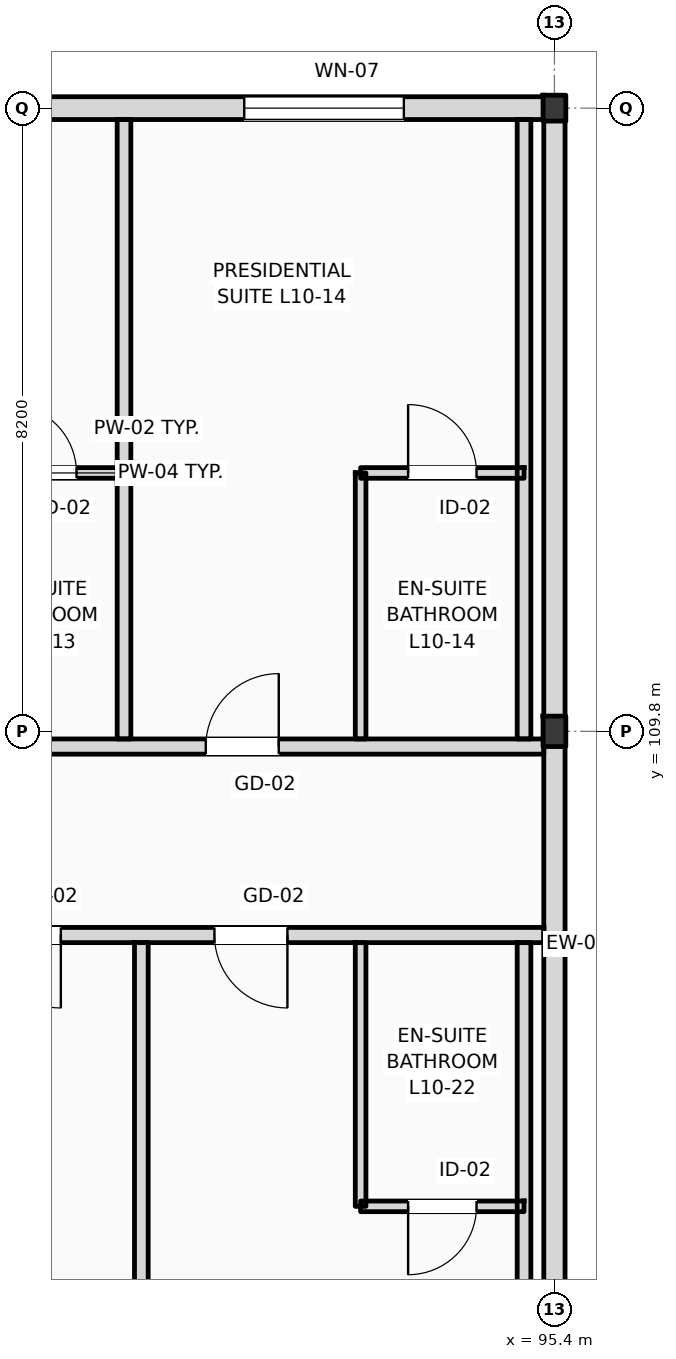
"""IFC4 building model, lengths in metres.
Left out: names, types, materials, properties, quantities, classifications, styles, units other than length and angle.
Written with IfcOpenShell. Run it as: python <this file> out.ifc"""

import sys

from ifc_helpers import new_model, si_unit, direction, frame, frame_2d, origin, origin_2d, place, context, subcontext, project, spatial, rectangle, i_section, extrude, element, fill, save


model = new_model("IFC4")
c1 = context("Model", 3, precision=1e-05, world=origin(), true_north=direction((0.0, 1.0)))
c2 = subcontext(c1, "Body", "Model", "MODEL_VIEW")
j1 = project(units=[si_unit("LENGTHUNIT", "METRE"), si_unit("PLANEANGLEUNIT", "RADIAN")], contexts=[c1])
p1 = place(None, origin())
s1 = spatial("IfcSite", under=j1, at=p1, CompositionType="ELEMENT")
p2 = place(p1, origin())
s2 = spatial("IfcBuilding", under=s1, at=p2, CompositionType="ELEMENT")
p3 = place(p2, frame((0.0, 0.0, 42.6)))
s3 = spatial("IfcBuildingStorey", under=s2, at=p3, CompositionType="ELEMENT", Elevation=42.6)
p4 = place(p3, frame((95.4, 109.8, 0.0), z_axis=(0.0, 0.0, 1.0), x_axis=(1.0, 0.0, 0.0)))
e1 = element("IfcColumn", 1, at=p4, inside=s3, PredefinedType="COLUMN", context=c2, shape_type="SweptSolid", body=[
    extrude(i_section(OverallWidth=0.3, OverallDepth=0.4, WebThickness=0.013, FlangeThickness=0.024, FilletRadius=0.027, at=origin_2d()), origin(), (0.0, 0.0, 1.0), 4.2),
])
p5 = place(p3, frame((95.4, 118.0, 0.0), z_axis=(0.0, 0.0, 1.0), x_axis=(1.0, 0.0, 0.0)))
e2 = element("IfcColumn", 2, at=p5, inside=s3, PredefinedType="COLUMN", context=c2, shape_type="SweptSolid", body=[
    extrude(i_section(OverallWidth=0.3, OverallDepth=0.34, WebThickness=0.012, FlangeThickness=0.021, FilletRadius=0.027, at=origin_2d()), origin(), (0.0, 0.0, 1.0), 4.2),
])
p6 = place(p3, frame((22.5, 118.0, 0.0), z_axis=(0.0, 0.0, 1.0), x_axis=(1.0, 0.0, 0.0)))
e3 = element("IfcWall", 3, at=p6, inside=s3, PredefinedType="STANDARD", context=c2, shape_type="SweptSolid", body=[
    extrude(rectangle(XDim=72.9, YDim=0.3, at=frame_2d((36.45, 0.0))), origin(), (0.0, 0.0, 1.0), 3.42),
])
p7 = place(p6, frame((3.611, 0.0, 0.9)))
e4 = element("IfcOpeningElement", 4, at=p7, cuts=e3, PredefinedType="OPENING", context=c2, shape_type="SweptSolid", body=[
    extrude(rectangle(XDim=1.35, YDim=1.75, at=frame_2d((0.675, 0.875))), frame((0.0, 0.16, 0.0), z_axis=(0.0, -1.0, 0.0), x_axis=(1.0, 0.0, 0.0)), (0.0, 0.0, 1.0), 0.32),
])
p8 = place(p6, frame((7.091, 0.0, 0.0)))
e5 = element("IfcOpeningElement", 5, at=p8, cuts=e3, PredefinedType="OPENING", context=c2, shape_type="SweptSolid", body=[
    extrude(rectangle(XDim=1.2, YDim=2.25, at=frame_2d((0.6, 1.125))), frame((0.0, 0.16, 0.0), z_axis=(0.0, -1.0, 0.0), x_axis=(1.0, 0.0, 0.0)), (0.0, 0.0, 1.0), 0.32),
])
p9 = place(p6, frame((12.328, 0.0, 0.9)))
e6 = element("IfcOpeningElement", 6, at=p9, cuts=e3, PredefinedType="OPENING", context=c2, shape_type="SweptSolid", body=[
    extrude(rectangle(XDim=2.0, YDim=2.34, at=frame_2d((1.0, 1.17))), frame((0.0, 0.16, 0.0), z_axis=(0.0, -1.0, 0.0), x_axis=(1.0, 0.0, 0.0)), (0.0, 0.0, 1.0), 0.32),
])
p10 = place(p6, frame((19.12, 0.0, 0.9)))
e7 = element("IfcOpeningElement", 7, at=p10, cuts=e3, PredefinedType="OPENING", context=c2, shape_type="SweptSolid", body=[
    extrude(rectangle(XDim=1.35, YDim=2.34, at=frame_2d((0.675, 1.17))), frame((0.0, 0.16, 0.0), z_axis=(0.0, -1.0, 0.0), x_axis=(1.0, 0.0, 0.0)), (0.0, 0.0, 1.0), 0.32),
])
p11 = place(p6, frame((22.696, 0.0, 0.0)))
e8 = element("IfcOpeningElement", 8, at=p11, cuts=e3, PredefinedType="OPENING", context=c2, shape_type="SweptSolid", body=[
    extrude(rectangle(XDim=1.2, YDim=2.25, at=frame_2d((0.6, 1.125))), frame((0.0, 0.16, 0.0), z_axis=(0.0, -1.0, 0.0), x_axis=(1.0, 0.0, 0.0)), (0.0, 0.0, 1.0), 0.32),
])
p12 = place(p6, frame((27.205, 0.0, 0.9)))
e9 = element("IfcOpeningElement", 9, at=p12, cuts=e3, PredefinedType="OPENING", context=c2, shape_type="SweptSolid", body=[
    extrude(rectangle(XDim=3.1, YDim=2.34, at=frame_2d((1.55, 1.17))), frame((0.0, 0.16, 0.0), z_axis=(0.0, -1.0, 0.0), x_axis=(1.0, 0.0, 0.0)), (0.0, 0.0, 1.0), 0.32),
])
p13 = place(p6, frame((31.948, 0.0, 0.9)))
e10 = element("IfcOpeningElement", 10, at=p13, cuts=e3, PredefinedType="OPENING", context=c2, shape_type="SweptSolid", body=[
    extrude(rectangle(XDim=1.1, YDim=2.34, at=frame_2d((0.55, 1.17))), frame((0.0, 0.16, 0.0), z_axis=(0.0, -1.0, 0.0), x_axis=(1.0, 0.0, 0.0)), (0.0, 0.0, 1.0), 0.32),
])
p14 = place(p6, frame((38.12, 0.0, 0.0)))
e11 = element("IfcOpeningElement", 11, at=p14, cuts=e3, PredefinedType="OPENING", context=c2, shape_type="SweptSolid", body=[
    extrude(rectangle(XDim=1.2, YDim=2.25, at=frame_2d((0.6, 1.125))), frame((0.0, 0.16, 0.0), z_axis=(0.0, -1.0, 0.0), x_axis=(1.0, 0.0, 0.0)), (0.0, 0.0, 1.0), 0.32),
])
p15 = place(p6, frame((43.51, 0.0, 0.9)))
e12 = element("IfcOpeningElement", 12, at=p15, cuts=e3, PredefinedType="OPENING", context=c2, shape_type="SweptSolid", body=[
    extrude(rectangle(XDim=1.35, YDim=1.85, at=frame_2d((0.675, 0.925))), frame((0.0, 0.16, 0.0), z_axis=(0.0, -1.0, 0.0), x_axis=(1.0, 0.0, 0.0)), (0.0, 0.0, 1.0), 0.32),
])
p16 = place(p6, frame((47.178, 0.0, 0.9)))
e13 = element("IfcOpeningElement", 13, at=p16, cuts=e3, PredefinedType="OPENING", context=c2, shape_type="SweptSolid", body=[
    extrude(rectangle(XDim=1.5, YDim=1.9, at=frame_2d((0.75, 0.95))), frame((0.0, 0.16, 0.0), z_axis=(0.0, -1.0, 0.0), x_axis=(1.0, 0.0, 0.0)), (0.0, 0.0, 1.0), 0.32),
])
p17 = place(p6, frame((53.724, 0.0, 0.0)))
e14 = element("IfcOpeningElement", 14, at=p17, cuts=e3, PredefinedType="OPENING", context=c2, shape_type="SweptSolid", body=[
    extrude(rectangle(XDim=1.2, YDim=2.25, at=frame_2d((0.6, 1.125))), frame((0.0, 0.16, 0.0), z_axis=(0.0, -1.0, 0.0), x_axis=(1.0, 0.0, 0.0)), (0.0, 0.0, 1.0), 0.32),
])
p18 = place(p6, frame((58.712, 0.0, 0.9)))
e15 = element("IfcOpeningElement", 15, at=p18, cuts=e3, PredefinedType="OPENING", context=c2, shape_type="SweptSolid", body=[
    extrude(rectangle(XDim=1.8, YDim=2.0, at=frame_2d((0.9, 1.0))), frame((0.0, 0.16, 0.0), z_axis=(0.0, -1.0, 0.0), x_axis=(1.0, 0.0, 0.0)), (0.0, 0.0, 1.0), 0.32),
])
p19 = place(p6, frame((62.781, 0.0, 0.9)))
e16 = element("IfcOpeningElement", 16, at=p19, cuts=e3, PredefinedType="OPENING", context=c2, shape_type="SweptSolid", body=[
    extrude(rectangle(XDim=1.35, YDim=2.05, at=frame_2d((0.675, 1.025))), frame((0.0, 0.16, 0.0), z_axis=(0.0, -1.0, 0.0), x_axis=(1.0, 0.0, 0.0)), (0.0, 0.0, 1.0), 0.32),
])
p20 = place(p6, frame((68.819, 0.0, 0.9)))
e17 = element("IfcOpeningElement", 17, at=p20, cuts=e3, PredefinedType="OPENING", context=c2, shape_type="SweptSolid", body=[
    extrude(rectangle(XDim=2.1, YDim=2.1, at=frame_2d((1.05, 1.05))), frame((0.0, 0.16, 0.0), z_axis=(0.0, -1.0, 0.0), x_axis=(1.0, 0.0, 0.0)), (0.0, 0.0, 1.0), 0.32),
])
p21 = place(p3, frame((95.4, 96.0, 0.0), z_axis=(0.0, 0.0, 1.0), x_axis=(0.0, 1.0, 0.0)))
e18 = element("IfcWall", 18, at=p21, inside=s3, PredefinedType="STANDARD", context=c2, shape_type="SweptSolid", body=[
    extrude(rectangle(XDim=22.0, YDim=0.28, at=frame_2d((11.0, 0.0))), origin(), (0.0, 0.0, 1.0), 3.51),
])
p22 = place(p3, frame((10.65, 109.6, 0.0), z_axis=(0.0, 0.0, 1.0), x_axis=(1.0, 0.0, 0.0)))
e19 = element("IfcWall", 19, at=p22, inside=s3, PredefinedType="PARTITIONING", context=c2, shape_type="SweptSolid", body=[
    extrude(rectangle(XDim=84.61, YDim=0.2, at=frame_2d((42.305, 0.0))), origin(), (0.0, 0.0, 1.0), 3.38),
])
p23 = place(p22, frame((15.926, 0.0, 0.0)))
e20 = element("IfcOpeningElement", 20, at=p23, cuts=e19, PredefinedType="OPENING", context=c2, shape_type="SweptSolid", body=[
    extrude(rectangle(XDim=1.02, YDim=2.2, at=frame_2d((0.51, 1.1))), frame((0.0, 0.11, 0.0), z_axis=(0.0, -1.0, 0.0), x_axis=(1.0, 0.0, 0.0)), (0.0, 0.0, 1.0), 0.22),
])
p24 = place(p22, frame((18.45, 0.0, 0.0)))
e21 = element("IfcOpeningElement", 21, at=p24, cuts=e19, PredefinedType="OPENING", context=c2, shape_type="SweptSolid", body=[
    extrude(rectangle(XDim=1.02, YDim=2.2, at=frame_2d((0.51, 1.1))), frame((0.0, 0.11, 0.0), z_axis=(0.0, -1.0, 0.0), x_axis=(1.0, 0.0, 0.0)), (0.0, 0.0, 1.0), 0.22),
])
p25 = place(p22, frame((25.742, 0.0, 0.0)))
e22 = element("IfcOpeningElement", 22, at=p25, cuts=e19, PredefinedType="OPENING", context=c2, shape_type="SweptSolid", body=[
    extrude(rectangle(XDim=1.02, YDim=2.2, at=frame_2d((0.51, 1.1))), frame((0.0, 0.11, 0.0), z_axis=(0.0, -1.0, 0.0), x_axis=(1.0, 0.0, 0.0)), (0.0, 0.0, 1.0), 0.22),
])
p26 = place(p22, frame((31.385, 0.0, 0.0)))
e23 = element("IfcOpeningElement", 23, at=p26, cuts=e19, PredefinedType="OPENING", context=c2, shape_type="SweptSolid", body=[
    extrude(rectangle(XDim=1.02, YDim=2.2, at=frame_2d((0.51, 1.1))), frame((0.0, 0.11, 0.0), z_axis=(0.0, -1.0, 0.0), x_axis=(1.0, 0.0, 0.0)), (0.0, 0.0, 1.0), 0.22),
])
p27 = place(p22, frame((33.908, 0.0, 0.0)))
e24 = element("IfcOpeningElement", 24, at=p27, cuts=e19, PredefinedType="OPENING", context=c2, shape_type="SweptSolid", body=[
    extrude(rectangle(XDim=0.96, YDim=2.2, at=frame_2d((0.48, 1.1))), frame((0.0, 0.11, 0.0), z_axis=(0.0, -1.0, 0.0), x_axis=(1.0, 0.0, 0.0)), (0.0, 0.0, 1.0), 0.22),
])
p28 = place(p22, frame((41.201, 0.0, 0.0)))
e25 = element("IfcOpeningElement", 25, at=p28, cuts=e19, PredefinedType="OPENING", context=c2, shape_type="SweptSolid", body=[
    extrude(rectangle(XDim=0.96, YDim=2.2, at=frame_2d((0.48, 1.1))), frame((0.0, 0.11, 0.0), z_axis=(0.0, -1.0, 0.0), x_axis=(1.0, 0.0, 0.0)), (0.0, 0.0, 1.0), 0.22),
])
p29 = place(p22, frame((46.844, 0.0, 0.0)))
e26 = element("IfcOpeningElement", 26, at=p29, cuts=e19, PredefinedType="OPENING", context=c2, shape_type="SweptSolid", body=[
    extrude(rectangle(XDim=0.96, YDim=2.2, at=frame_2d((0.48, 1.1))), frame((0.0, 0.11, 0.0), z_axis=(0.0, -1.0, 0.0), x_axis=(1.0, 0.0, 0.0)), (0.0, 0.0, 1.0), 0.22),
])
p30 = place(p22, frame((49.337, 0.0, 0.0)))
e27 = element("IfcOpeningElement", 27, at=p30, cuts=e19, PredefinedType="OPENING", context=c2, shape_type="SweptSolid", body=[
    extrude(rectangle(XDim=0.96, YDim=2.2, at=frame_2d((0.48, 1.1))), frame((0.0, 0.11, 0.0), z_axis=(0.0, -1.0, 0.0), x_axis=(1.0, 0.0, 0.0)), (0.0, 0.0, 1.0), 0.22),
])
p31 = place(p22, frame((56.63, 0.0, 0.0)))
e28 = element("IfcOpeningElement", 28, at=p31, cuts=e19, PredefinedType="OPENING", context=c2, shape_type="SweptSolid", body=[
    extrude(rectangle(XDim=0.96, YDim=2.2, at=frame_2d((0.48, 1.1))), frame((0.0, 0.11, 0.0), z_axis=(0.0, -1.0, 0.0), x_axis=(1.0, 0.0, 0.0)), (0.0, 0.0, 1.0), 0.22),
])
p32 = place(p22, frame((62.523, 0.0, 0.0)))
e29 = element("IfcOpeningElement", 29, at=p32, cuts=e19, PredefinedType="OPENING", context=c2, shape_type="SweptSolid", body=[
    extrude(rectangle(XDim=0.96, YDim=2.2, at=frame_2d((0.48, 1.1))), frame((0.0, 0.11, 0.0), z_axis=(0.0, -1.0, 0.0), x_axis=(1.0, 0.0, 0.0)), (0.0, 0.0, 1.0), 0.22),
])
p33 = place(p22, frame((64.765, 0.0, 0.0)))
e30 = element("IfcOpeningElement", 30, at=p33, cuts=e19, PredefinedType="OPENING", context=c2, shape_type="SweptSolid", body=[
    extrude(rectangle(XDim=0.96, YDim=2.2, at=frame_2d((0.48, 1.1))), frame((0.0, 0.11, 0.0), z_axis=(0.0, -1.0, 0.0), x_axis=(1.0, 0.0, 0.0)), (0.0, 0.0, 1.0), 0.22),
])
p34 = place(p22, frame((72.057, 0.0, 0.0)))
e31 = element("IfcOpeningElement", 31, at=p34, cuts=e19, PredefinedType="OPENING", context=c2, shape_type="SweptSolid", body=[
    extrude(rectangle(XDim=0.96, YDim=2.2, at=frame_2d((0.48, 1.1))), frame((0.0, 0.11, 0.0), z_axis=(0.0, -1.0, 0.0), x_axis=(1.0, 0.0, 0.0)), (0.0, 0.0, 1.0), 0.22),
])
p35 = place(p22, frame((74.55, 0.0, 0.0)))
e32 = element("IfcOpeningElement", 32, at=p35, cuts=e19, PredefinedType="OPENING", context=c2, shape_type="SweptSolid", body=[
    extrude(rectangle(XDim=0.96, YDim=2.2, at=frame_2d((0.48, 1.1))), frame((0.0, 0.11, 0.0), z_axis=(0.0, -1.0, 0.0), x_axis=(1.0, 0.0, 0.0)), (0.0, 0.0, 1.0), 0.22),
])
p36 = place(p22, frame((80.163, 0.0, 0.0)))
e33 = element("IfcOpeningElement", 33, at=p36, cuts=e19, PredefinedType="OPENING", context=c2, shape_type="SweptSolid", body=[
    extrude(rectangle(XDim=0.96, YDim=2.2, at=frame_2d((0.48, 1.1))), frame((0.0, 0.11, 0.0), z_axis=(0.0, -1.0, 0.0), x_axis=(1.0, 0.0, 0.0)), (0.0, 0.0, 1.0), 0.22),
])
p37 = place(p22, frame((2.716, 0.0, 0.0)))
e34 = element("IfcOpeningElement", 34, at=p37, cuts=e19, PredefinedType="OPENING", context=c2, shape_type="SweptSolid", body=[
    extrude(rectangle(XDim=1.35, YDim=2.25, at=frame_2d((0.675, 1.125))), frame((0.0, 0.11, 0.0), z_axis=(0.0, -1.0, 0.0), x_axis=(1.0, 0.0, 0.0)), (0.0, 0.0, 1.0), 0.22),
])
p38 = place(p22, frame((6.65, 0.0, 0.0)))
e35 = element("IfcOpeningElement", 35, at=p38, cuts=e19, PredefinedType="OPENING", context=c2, shape_type="SweptSolid", body=[
    extrude(rectangle(XDim=1.35, YDim=2.25, at=frame_2d((0.675, 1.125))), frame((0.0, 0.11, 0.0), z_axis=(0.0, -1.0, 0.0), x_axis=(1.0, 0.0, 0.0)), (0.0, 0.0, 1.0), 0.22),
])
p39 = place(p22, frame((10.583, 0.0, 0.0)))
e36 = element("IfcOpeningElement", 36, at=p39, cuts=e19, PredefinedType="OPENING", context=c2, shape_type="SweptSolid", body=[
    extrude(rectangle(XDim=1.35, YDim=2.25, at=frame_2d((0.675, 1.125))), frame((0.0, 0.11, 0.0), z_axis=(0.0, -1.0, 0.0), x_axis=(1.0, 0.0, 0.0)), (0.0, 0.0, 1.0), 0.22),
])
p40 = place(p3, frame((79.76, 107.12, 0.0), z_axis=(0.0, 0.0, 1.0), x_axis=(1.0, 0.0, 0.0)))
e37 = element("IfcWall", 37, at=p40, inside=s3, PredefinedType="PARTITIONING", context=c2, shape_type="SweptSolid", body=[
    extrude(rectangle(XDim=15.5, YDim=0.2, at=frame_2d((7.75, 0.0))), origin(), (0.0, 0.0, 1.0), 3.94),
])
p41 = place(p40, frame((3.078, 0.0, 0.0)))
e38 = element("IfcOpeningElement", 38, at=p41, cuts=e37, PredefinedType="OPENING", context=c2, shape_type="SweptSolid", body=[
    extrude(rectangle(XDim=0.96, YDim=2.2, at=frame_2d((0.48, 1.1))), frame((0.0, 0.11, 0.0), z_axis=(0.0, -1.0, 0.0), x_axis=(1.0, 0.0, 0.0)), (0.0, 0.0, 1.0), 0.22),
])
p42 = place(p40, frame((8.186, 0.0, 0.0)))
e39 = element("IfcOpeningElement", 39, at=p42, cuts=e37, PredefinedType="OPENING", context=c2, shape_type="SweptSolid", body=[
    extrude(rectangle(XDim=0.96, YDim=2.2, at=frame_2d((0.48, 1.1))), frame((0.0, 0.11, 0.0), z_axis=(0.0, -1.0, 0.0), x_axis=(1.0, 0.0, 0.0)), (0.0, 0.0, 1.0), 0.22),
])
p43 = place(p40, frame((11.167, 0.0, 0.0)))
e40 = element("IfcOpeningElement", 40, at=p43, cuts=e37, PredefinedType="OPENING", context=c2, shape_type="SweptSolid", body=[
    extrude(rectangle(XDim=0.96, YDim=2.2, at=frame_2d((0.48, 1.1))), frame((0.0, 0.11, 0.0), z_axis=(0.0, -1.0, 0.0), x_axis=(1.0, 0.0, 0.0)), (0.0, 0.0, 1.0), 0.22),
])
p44 = place(p3, frame((89.737, 109.7, 0.0), z_axis=(0.0, 0.0, 1.0), x_axis=(0.0, 1.0, 0.0)))
e41 = element("IfcWall", 41, at=p44, inside=s3, PredefinedType="PARTITIONING", context=c2, shape_type="SweptSolid", body=[
    extrude(rectangle(XDim=8.15, YDim=0.18, at=frame_2d((4.075, 0.0))), origin(), (0.0, 0.0, 1.0), 3.94),
])
p45 = place(p3, frame((87.587, 113.2, 0.0), z_axis=(0.0, 0.0, 1.0), x_axis=(1.0, 0.0, 0.0)))
e42 = element("IfcWall", 42, at=p45, inside=s3, PredefinedType="PARTITIONING", context=c2, shape_type="SweptSolid", body=[
    extrude(rectangle(XDim=2.15, YDim=0.14, at=frame_2d((1.075, 0.0))), origin(), (0.0, 0.0, 1.0), 3.94),
])
p46 = place(p45, frame((0.625, 0.0, 0.0)))
e43 = element("IfcOpeningElement", 43, at=p46, cuts=e42, PredefinedType="OPENING", context=c2, shape_type="SweptSolid", body=[
    extrude(rectangle(XDim=0.9, YDim=2.1, at=frame_2d((0.45, 1.05))), frame((0.0, 0.08, 0.0), z_axis=(0.0, -1.0, 0.0), x_axis=(1.0, 0.0, 0.0)), (0.0, 0.0, 1.0), 0.16),
])
p47 = place(p3, frame((95.0, 109.7, 0.0), z_axis=(0.0, 0.0, 1.0), x_axis=(0.0, 1.0, 0.0)))
e44 = element("IfcWall", 44, at=p47, inside=s3, PredefinedType="PARTITIONING", context=c2, shape_type="SweptSolid", body=[
    extrude(rectangle(XDim=8.15, YDim=0.18, at=frame_2d((4.075, 0.0))), origin(), (0.0, 0.0, 1.0), 3.94),
])
p48 = place(p3, frame((92.85, 109.7, 0.0), z_axis=(0.0, 0.0, 1.0), x_axis=(0.0, 1.0, 0.0)))
e45 = element("IfcWall", 45, at=p48, inside=s3, PredefinedType="PARTITIONING", context=c2, shape_type="SweptSolid", body=[
    extrude(rectangle(XDim=3.5, YDim=0.14, at=frame_2d((1.75, 0.0))), origin(), (0.0, 0.0, 1.0), 3.57),
])
p49 = place(p3, frame((92.85, 113.2, 0.0), z_axis=(0.0, 0.0, 1.0), x_axis=(1.0, 0.0, 0.0)))
e46 = element("IfcWall", 46, at=p49, inside=s3, PredefinedType="PARTITIONING", context=c2, shape_type="SweptSolid", body=[
    extrude(rectangle(XDim=2.15, YDim=0.14, at=frame_2d((1.075, 0.0))), origin(), (0.0, 0.0, 1.0), 3.94),
])
p50 = place(p49, frame((0.625, 0.0, 0.0)))
e47 = element("IfcOpeningElement", 47, at=p50, cuts=e46, PredefinedType="OPENING", context=c2, shape_type="SweptSolid", body=[
    extrude(rectangle(XDim=0.9, YDim=2.1, at=frame_2d((0.45, 1.05))), frame((0.0, 0.08, 0.0), z_axis=(0.0, -1.0, 0.0), x_axis=(1.0, 0.0, 0.0)), (0.0, 0.0, 1.0), 0.16),
])
p51 = place(p3, frame((89.965, 96.14, 0.0), z_axis=(0.0, 0.0, 1.0), x_axis=(0.0, 1.0, 0.0)))
e48 = element("IfcWall", 48, at=p51, inside=s3, PredefinedType="PARTITIONING", context=c2, shape_type="SweptSolid", body=[
    extrude(rectangle(XDim=10.88, YDim=0.18, at=frame_2d((5.44, 0.0))), origin(), (0.0, 0.0, 1.0), 3.57),
])
p52 = place(p3, frame((95.0, 96.14, 0.0), z_axis=(0.0, 0.0, 1.0), x_axis=(0.0, 1.0, 0.0)))
e49 = element("IfcWall", 49, at=p52, inside=s3, PredefinedType="PARTITIONING", context=c2, shape_type="SweptSolid", body=[
    extrude(rectangle(XDim=10.88, YDim=0.18, at=frame_2d((5.44, 0.0))), origin(), (0.0, 0.0, 1.0), 3.94),
])
p53 = place(p3, frame((92.85, 103.55, 0.0), z_axis=(0.0, 0.0, 1.0), x_axis=(0.0, 1.0, 0.0)))
e50 = element("IfcWall", 50, at=p53, inside=s3, PredefinedType="PARTITIONING", context=c2, shape_type="SweptSolid", body=[
    extrude(rectangle(XDim=3.47, YDim=0.14, at=frame_2d((1.735, 0.0))), origin(), (0.0, 0.0, 1.0), 3.57),
])
p54 = place(p3, frame((92.85, 103.55, 0.0), z_axis=(0.0, 0.0, 1.0), x_axis=(1.0, 0.0, 0.0)))
e51 = element("IfcWall", 51, at=p54, inside=s3, PredefinedType="PARTITIONING", context=c2, shape_type="SweptSolid", body=[
    extrude(rectangle(XDim=2.15, YDim=0.14, at=frame_2d((1.075, 0.0))), origin(), (0.0, 0.0, 1.0), 3.94),
])
p55 = place(p54, frame((0.625, 0.0, 0.0)))
e52 = element("IfcOpeningElement", 52, at=p55, cuts=e51, PredefinedType="OPENING", context=c2, shape_type="SweptSolid", body=[
    extrude(rectangle(XDim=0.9, YDim=2.1, at=frame_2d((0.45, 1.05))), frame((0.0, 0.08, 0.0), z_axis=(0.0, -1.0, 0.0), x_axis=(1.0, 0.0, 0.0)), (0.0, 0.0, 1.0), 0.16),
])
p56 = place(p20, origin())
e53 = element("IfcWindow", 53, at=p56, inside=s3, PartitioningType="DOUBLE_PANEL_VERTICAL", PredefinedType="WINDOW", context=c2, shape_type="SweptSolid", body=[
    extrude(rectangle(XDim=2.1, YDim=2.1, at=frame_2d((1.05, 1.05))), frame((0.0, 0.03, 0.0), z_axis=(0.0, -1.0, 0.0), x_axis=(1.0, 0.0, 0.0)), (0.0, 0.0, 1.0), 0.06),
])
fill(e17, e53)
p57 = place(p46, origin())
e54 = element("IfcDoor", 54, at=p57, inside=s3, OperationType="SINGLE_SWING_LEFT", PredefinedType="DOOR", context=c2, shape_type="SweptSolid", body=[
    extrude(rectangle(XDim=0.9, YDim=2.1, at=frame_2d((0.45, 1.05))), frame((0.0, 0.025, 0.0), z_axis=(0.0, -1.0, 0.0), x_axis=(1.0, 0.0, 0.0)), (0.0, 0.0, 1.0), 0.05),
])
fill(e43, e54)
p58 = place(p36, origin())
e55 = element("IfcDoor", 55, at=p58, inside=s3, OperationType="SINGLE_SWING_RIGHT", PredefinedType="DOOR", context=c2, shape_type="SweptSolid", body=[
    extrude(rectangle(XDim=0.96, YDim=2.2, at=frame_2d((0.48, 1.1))), frame((0.0, 0.025, 0.0), z_axis=(0.0, -1.0, 0.0), x_axis=(1.0, 0.0, 0.0)), (0.0, 0.0, 1.0), 0.05),
])
fill(e33, e55)
p59 = place(p50, origin())
e56 = element("IfcDoor", 56, at=p59, inside=s3, OperationType="SINGLE_SWING_LEFT", PredefinedType="DOOR", context=c2, shape_type="SweptSolid", body=[
    extrude(rectangle(XDim=0.9, YDim=2.1, at=frame_2d((0.45, 1.05))), frame((0.0, 0.025, 0.0), z_axis=(0.0, -1.0, 0.0), x_axis=(1.0, 0.0, 0.0)), (0.0, 0.0, 1.0), 0.05),
])
fill(e47, e56)
p60 = place(p42, frame((0.96, 0.0, 0.0), z_axis=(0.0, 0.0, 1.0), x_axis=(-1.0, 0.0, 0.0)))
e57 = element("IfcDoor", 57, at=p60, inside=s3, OperationType="SINGLE_SWING_RIGHT", PredefinedType="DOOR", context=c2, shape_type="SweptSolid", body=[
    extrude(rectangle(XDim=0.96, YDim=2.2, at=frame_2d((0.48, 1.1))), frame((0.0, 0.025, 0.0), z_axis=(0.0, -1.0, 0.0), x_axis=(1.0, 0.0, 0.0)), (0.0, 0.0, 1.0), 0.05),
])
fill(e39, e57)
p61 = place(p43, frame((0.96, 0.0, 0.0), z_axis=(0.0, 0.0, 1.0), x_axis=(-1.0, 0.0, 0.0)))
e58 = element("IfcDoor", 58, at=p61, inside=s3, OperationType="SINGLE_SWING_RIGHT", PredefinedType="DOOR", context=c2, shape_type="SweptSolid", body=[
    extrude(rectangle(XDim=0.96, YDim=2.2, at=frame_2d((0.48, 1.1))), frame((0.0, 0.025, 0.0), z_axis=(0.0, -1.0, 0.0), x_axis=(1.0, 0.0, 0.0)), (0.0, 0.0, 1.0), 0.05),
])
fill(e40, e58)
p62 = place(p55, frame((0.9, 0.0, 0.0), z_axis=(0.0, 0.0, 1.0), x_axis=(-1.0, 0.0, 0.0)))
e59 = element("IfcDoor", 59, at=p62, inside=s3, OperationType="SINGLE_SWING_LEFT", PredefinedType="DOOR", context=c2, shape_type="SweptSolid", body=[
    extrude(rectangle(XDim=0.9, YDim=2.1, at=frame_2d((0.45, 1.05))), frame((0.0, 0.025, 0.0), z_axis=(0.0, -1.0, 0.0), x_axis=(1.0, 0.0, 0.0)), (0.0, 0.0, 1.0), 0.05),
])
fill(e52, e59)
save(model, sys.argv[1])
